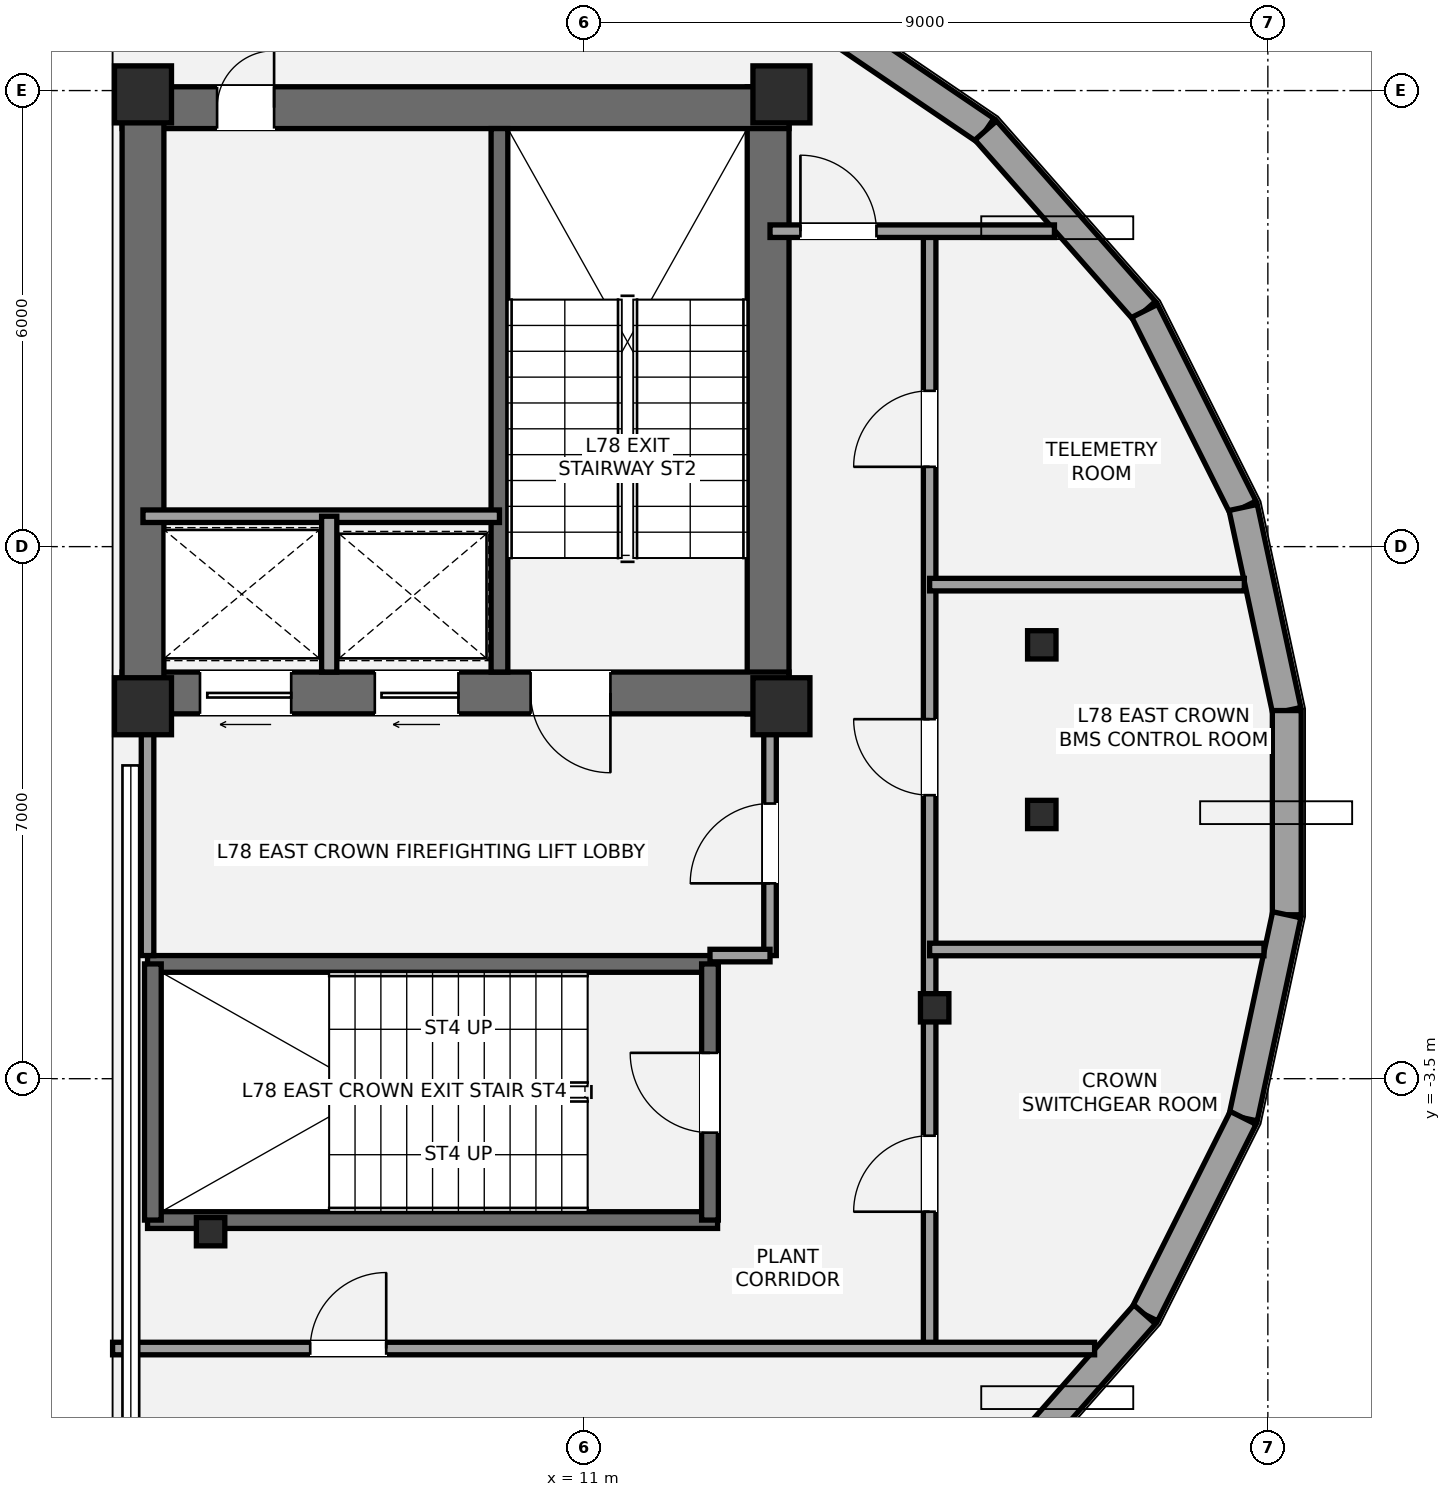
"""IFC4 building model, lengths in metres.
Left out: names, types, materials, properties, quantities, classifications, styles, units other than length and angle.
Written with IfcOpenShell. Run it as: python <this file> out.ifc"""

import sys

from ifc_helpers import new_model, si_unit, direction, frame, frame_2d, origin, origin_2d, place, context, subcontext, project, spatial, rectangle, i_section, extrude, element, fill, save


model = new_model("IFC4")
c1 = context("Model", 3, precision=1e-05, world=origin(), true_north=direction((0.0, 1.0)))
c2 = subcontext(c1, "Body", "Model", "MODEL_VIEW")
j1 = project(units=[si_unit("LENGTHUNIT", "METRE"), si_unit("PLANEANGLEUNIT", "RADIAN")], contexts=[c1])
p1 = place(None, origin())
s1 = spatial("IfcSite", under=j1, at=p1, CompositionType="ELEMENT")
p2 = place(p1, origin())
s2 = spatial("IfcBuilding", under=s1, at=p2, CompositionType="ELEMENT")
p3 = place(p2, frame((0.0, 0.0, 276.8)))
s3 = spatial("IfcBuildingStorey", under=s2, at=p3, CompositionType="ELEMENT", Elevation=276.8)
p4 = place(p3, frame((13.425, 1.3, 0.0), z_axis=(0.0, 0.0, 1.0), x_axis=(0.0, 1.0, 0.0)))
e1 = element("IfcWall", 1, at=p4, inside=s3, PredefinedType="SHEAR", context=c2, shape_type="SweptSolid", body=[
    extrude(rectangle(XDim=8.25, YDim=0.55, at=frame_2d((4.125, 0.0))), origin(), (0.0, 0.0, 1.0), 3.8),
])
p5 = place(p3, frame((4.925, 9.275, 0.0), z_axis=(0.0, 0.0, 1.0), x_axis=(1.0, 0.0, 0.0)))
e2 = element("IfcWall", 2, at=p5, inside=s3, PredefinedType="SHEAR", context=c2, shape_type="SweptSolid", body=[
    extrude(rectangle(XDim=8.775, YDim=0.55, at=frame_2d((4.387, 0.0))), origin(), (0.0, 0.0, 1.0), 3.8),
])
p6 = place(p5, frame((1.25, 0.0, 0.0)))
e3 = element("IfcOpeningElement", 3, at=p6, cuts=e2, PredefinedType="OPENING", context=c2, shape_type="SweptSolid", body=[
    extrude(rectangle(XDim=0.75, YDim=2.1, at=frame_2d((0.375, 1.05))), frame((0.0, 0.285, 0.0), z_axis=(0.0, -1.0, 0.0), x_axis=(1.0, 0.0, 0.0)), (0.0, 0.0, 1.0), 0.57),
])
p7 = place(p3, frame((13.7, 1.575, 0.0), z_axis=(0.0, 0.0, 1.0), x_axis=(-1.0, 0.0, 0.0)))
e4 = element("IfcWall", 4, at=p7, inside=s3, PredefinedType="SHEAR", context=c2, shape_type="SweptSolid", body=[
    extrude(rectangle(XDim=8.775, YDim=0.55, at=frame_2d((4.387, 0.0))), origin(), (0.0, 0.0, 1.0), 3.8),
])
p8 = place(p7, frame((2.35, 0.0, 0.0)))
e5 = element("IfcOpeningElement", 5, at=p8, cuts=e4, PredefinedType="OPENING", context=c2, shape_type="SweptSolid", body=[
    extrude(rectangle(XDim=1.05, YDim=2.15, at=frame_2d((0.525, 1.075))), frame((0.0, 0.285, 0.0), z_axis=(0.0, -1.0, 0.0), x_axis=(1.0, 0.0, 0.0)), (0.0, 0.0, 1.0), 0.57),
])
p9 = place(p7, frame((6.55, 0.0, 0.0)))
e6 = element("IfcOpeningElement", 6, at=p9, cuts=e4, PredefinedType="OPENING", context=c2, shape_type="SweptSolid", body=[
    extrude(rectangle(XDim=1.2, YDim=2.2, at=frame_2d((0.6, 1.1))), frame((0.0, 0.285, 0.0), z_axis=(0.0, -1.0, 0.0), x_axis=(1.0, 0.0, 0.0)), (0.0, 0.0, 1.0), 0.57),
])
p10 = place(p7, frame((4.35, 0.0, 0.0)))
e7 = element("IfcOpeningElement", 7, at=p10, cuts=e4, PredefinedType="OPENING", context=c2, shape_type="SweptSolid", body=[
    extrude(rectangle(XDim=1.1, YDim=2.2, at=frame_2d((0.55, 1.1))), frame((0.0, 0.285, 0.0), z_axis=(0.0, -1.0, 0.0), x_axis=(1.0, 0.0, 0.0)), (0.0, 0.0, 1.0), 0.57),
])
p11 = place(p3, frame((5.2, 1.3, 0.0), z_axis=(0.0, 0.0, 1.0), x_axis=(0.0, 1.0, 0.0)))
e8 = element("IfcWall", 8, at=p11, inside=s3, PredefinedType="SHEAR", context=c2, shape_type="SweptSolid", body=[
    extrude(rectangle(XDim=8.25, YDim=0.55, at=frame_2d((4.125, 0.0))), origin(), (0.0, 0.0, 1.0), 3.8),
])
p12 = place(p3, frame((9.89, 1.85, 0.0), z_axis=(0.0, 0.0, 1.0), x_axis=(0.0, 1.0, 0.0)))
e9 = element("IfcWall", 9, at=p12, inside=s3, PredefinedType="SHEAR", context=c2, shape_type="SweptSolid", body=[
    extrude(rectangle(XDim=7.15, YDim=0.22, at=frame_2d((3.575, 0.0))), origin(), (0.0, 0.0, 1.0), 3.8),
])
for number, where, z_axis, x_axis in (
    (10, (5.26, -1.99, 0.0), (0.0, 0.0, 1.0), (1.0, 0.0, 0.0)),
    (11, (5.26, -5.36, 0.0), (0.0, 0.0, 1.0), (1.0, 0.0, 0.0)),
):
    element("IfcWall", number, at=place(p3, frame(where, z_axis=z_axis, x_axis=x_axis)), inside=s3, PredefinedType="SHEAR", context=c2, shape_type="SweptSolid", body=[
        extrude(rectangle(XDim=7.5, YDim=0.22, at=frame_2d((3.75, 0.0))), origin(), (0.0, 0.0, 1.0), 3.8),
    ])
p13 = place(p3, frame((5.33, -5.36, 0.0), z_axis=(0.0, 0.0, 1.0), x_axis=(0.0, 1.0, 0.0)))
e12 = element("IfcWall", 12, at=p13, inside=s3, PredefinedType="SHEAR", context=c2, shape_type="SweptSolid", body=[
    extrude(rectangle(XDim=3.37, YDim=0.22, at=frame_2d((1.685, 0.0))), origin(), (0.0, 0.0, 1.0), 3.8),
])
p14 = place(p3, frame((12.66, -5.36, 0.0), z_axis=(0.0, 0.0, 1.0), x_axis=(0.0, 1.0, 0.0)))
e13 = element("IfcWall", 13, at=p14, inside=s3, PredefinedType="SHEAR", context=c2, shape_type="SweptSolid", body=[
    extrude(rectangle(XDim=3.37, YDim=0.22, at=frame_2d((1.685, 0.0))), origin(), (0.0, 0.0, 1.0), 3.8),
])
p15 = place(p14, frame((1.15, 0.0, 0.0)))
e14 = element("IfcOpeningElement", 14, at=p15, cuts=e13, PredefinedType="OPENING", context=c2, shape_type="SweptSolid", body=[
    extrude(rectangle(XDim=1.05, YDim=2.15, at=frame_2d((0.525, 1.075))), frame((0.0, 0.12, 0.0), z_axis=(0.0, -1.0, 0.0), x_axis=(1.0, 0.0, 0.0)), (0.0, 0.0, 1.0), 0.24),
])
for number, where, z_axis, x_axis in (
    (15, (5.2, 1.4, 0.0), (0.0, 0.0, 1.0), (1.0, 0.0, 0.0)),
    (16, (5.2, 9.45, 0.0), (0.0, 0.0, 1.0), (1.0, 0.0, 0.0)),
    (17, (13.6, 1.4, 0.0), (0.0, 0.0, 1.0), (1.0, 0.0, 0.0)),
    (18, (13.6, 9.45, 0.0), (0.0, 0.0, 1.0), (1.0, 0.0, 0.0)),
):
    element("IfcColumn", number, at=place(p3, frame(where, z_axis=z_axis, x_axis=x_axis)), inside=s3, PredefinedType="PILASTER", context=c2, shape_type="SweptSolid", body=[
        extrude(rectangle(XDim=0.75, YDim=0.75, at=origin_2d()), origin(), (0.0, 0.0, 1.0), 3.8),
    ])
for number, where, z_axis, x_axis in (
    (19, (17.026, 2.208, 0.0), (0.0, 0.0, 1.0), (1.0, 0.0, 0.0)),
    (20, (6.09, -5.513, 0.0), (0.0, 0.0, 1.0), (1.0, 0.0, 0.0)),
    (21, (15.616, -2.567, 0.0), (0.0, 0.0, 1.0), (1.0, 0.0, 0.0)),
    (22, (17.026, -0.024, 0.0), (0.0, 0.0, 1.0), (1.0, 0.0, 0.0)),
):
    element("IfcColumn", number, at=place(p3, frame(where, z_axis=z_axis, x_axis=x_axis)), inside=s3, PredefinedType="COLUMN", context=c2, shape_type="SweptSolid", body=[
        extrude(i_section(OverallWidth=0.374, OverallDepth=0.372, WebThickness=0.016, FlangeThickness=0.026, at=origin_2d()), origin(), (0.0, 0.0, 1.0), 3.8),
    ])
p16 = place(p3, frame((16.289, 8.975, 0.0), z_axis=(0.0, 0.0, 1.0), x_axis=(-0.827558908117, 0.561378885955, 0.0)))
e23 = element("IfcWall", 23, at=p16, inside=s3, PredefinedType="ELEMENTEDWALL", context=c2, shape_type="SweptSolid", body=[
    extrude(rectangle(XDim=3.508, YDim=0.38, at=frame_2d((1.754, 0.0))), origin(), (0.0, 0.0, 1.0), 2.97),
])
p17 = place(p3, frame((18.379, 6.602, 0.0), z_axis=(0.0, 0.0, 1.0), x_axis=(-0.660965358004, 0.750416414745, 0.0)))
e24 = element("IfcWall", 24, at=p17, inside=s3, PredefinedType="ELEMENTEDWALL", context=c2, shape_type="SweptSolid", body=[
    extrude(rectangle(XDim=3.163, YDim=0.38, at=frame_2d((1.582, 0.0))), origin(), (0.0, 0.0, 1.0), 2.97),
])
p18 = place(p3, frame((19.675, 4.015, 0.0), z_axis=(0.0, 0.0, 1.0), x_axis=(-0.447922433418, 0.894072420803, 0.0)))
e25 = element("IfcWall", 25, at=p18, inside=s3, PredefinedType="ELEMENTEDWALL", context=c2, shape_type="SweptSolid", body=[
    extrude(rectangle(XDim=2.893, YDim=0.38, at=frame_2d((1.446, 0.0))), origin(), (0.0, 0.0, 1.0), 2.97),
])
p19 = place(p3, frame((20.249, 1.344, 0.0), z_axis=(0.0, 0.0, 1.0), x_axis=(-0.210029343878, 0.977695082687, 0.0)))
e26 = element("IfcWall", 26, at=p19, inside=s3, PredefinedType="ELEMENTEDWALL", context=c2, shape_type="SweptSolid", body=[
    extrude(rectangle(XDim=2.733, YDim=0.38, at=frame_2d((1.366, 0.0))), origin(), (0.0, 0.0, 1.0), 2.97),
])
p20 = place(p3, frame((20.249, -1.344, 0.0), z_axis=(0.0, 0.0, 1.0), x_axis=(0.0, 1.0, 0.0)))
e27 = element("IfcWall", 27, at=p20, inside=s3, PredefinedType="ELEMENTEDWALL", context=c2, shape_type="SweptSolid", body=[
    extrude(rectangle(XDim=2.687, YDim=0.38, at=frame_2d((1.344, 0.0))), origin(), (0.0, 0.0, 1.0), 2.97),
])
p21 = place(p3, frame((19.675, -4.015, 0.0), z_axis=(0.0, 0.0, 1.0), x_axis=(0.210029343878, 0.977695082687, 0.0)))
e28 = element("IfcWall", 28, at=p21, inside=s3, PredefinedType="ELEMENTEDWALL", context=c2, shape_type="SweptSolid", body=[
    extrude(rectangle(XDim=2.733, YDim=0.38, at=frame_2d((1.366, 0.0))), origin(), (0.0, 0.0, 1.0), 2.97),
])
p22 = place(p3, frame((18.379, -6.602, 0.0), z_axis=(0.0, 0.0, 1.0), x_axis=(0.447922433418, 0.894072420803, 0.0)))
e29 = element("IfcWall", 29, at=p22, inside=s3, PredefinedType="ELEMENTEDWALL", context=c2, shape_type="SweptSolid", body=[
    extrude(rectangle(XDim=2.893, YDim=0.38, at=frame_2d((1.446, 0.0))), origin(), (0.0, 0.0, 1.0), 2.97),
])
p23 = place(p3, frame((16.289, -8.975, 0.0), z_axis=(0.0, 0.0, 1.0), x_axis=(0.660965358004, 0.750416414745, 0.0)))
e30 = element("IfcWall", 30, at=p23, inside=s3, PredefinedType="ELEMENTEDWALL", context=c2, shape_type="SweptSolid", body=[
    extrude(rectangle(XDim=3.163, YDim=0.38, at=frame_2d((1.582, 0.0))), origin(), (0.0, 0.0, 1.0), 2.97),
])
p24 = place(p3, frame((5.2, 3.9, 0.0), z_axis=(0.0, 0.0, 1.0), x_axis=(1.0, 0.0, 0.0)))
e31 = element("IfcWall", 31, at=p24, inside=s3, PredefinedType="PARTITIONING", context=c2, shape_type="SweptSolid", body=[
    extrude(rectangle(XDim=4.69, YDim=0.165, at=frame_2d((2.345, 0.0))), origin(), (0.0, 0.0, 1.0), 3.6),
])
p25 = place(p3, frame((7.65, 1.85, 0.0), z_axis=(0.0, 0.0, 1.0), x_axis=(0.0, 1.0, 0.0)))
e32 = element("IfcWall", 32, at=p25, inside=s3, PredefinedType="SOLIDWALL", context=c2, shape_type="SweptSolid", body=[
    extrude(rectangle(XDim=2.05, YDim=0.2, at=frame_2d((1.025, 0.0))), origin(), (0.0, 0.0, 1.0), 3.6),
])
p26 = place(p3, frame((5.26, -1.88, 0.0), z_axis=(0.0, 0.0, 1.0), x_axis=(0.0, 1.0, 0.0)))
e33 = element("IfcWall", 33, at=p26, inside=s3, PredefinedType="PARTITIONING", context=c2, shape_type="SweptSolid", body=[
    extrude(rectangle(XDim=3.23, YDim=0.165, at=frame_2d((1.615, 0.0))), origin(), (0.0, 0.0, 1.0), 3.6),
])
p27 = place(p3, frame((13.45, -1.88, 0.0), z_axis=(0.0, 0.0, 1.0), x_axis=(0.0, 1.0, 0.0)))
e34 = element("IfcWall", 34, at=p27, inside=s3, PredefinedType="PARTITIONING", context=c2, shape_type="SweptSolid", body=[
    extrude(rectangle(XDim=3.23, YDim=0.165, at=frame_2d((1.615, 0.0))), origin(), (0.0, 0.0, 1.0), 3.061),
])
p28 = place(p27, frame((0.95, 0.0, 0.0)))
e35 = element("IfcOpeningElement", 35, at=p28, cuts=e34, PredefinedType="OPENING", context=c2, shape_type="SweptSolid", body=[
    extrude(rectangle(XDim=1.05, YDim=2.15, at=frame_2d((0.525, 1.075))), frame((0.0, 0.093, 0.0), z_axis=(0.0, -1.0, 0.0), x_axis=(1.0, 0.0, 0.0)), (0.0, 0.0, 1.0), 0.185),
])
p29 = place(p3, frame((12.66, -1.88, 0.0), z_axis=(0.0, 0.0, 1.0), x_axis=(1.0, 0.0, 0.0)))
e36 = element("IfcWall", 36, at=p29, inside=s3, PredefinedType="PARTITIONING", context=c2, shape_type="SweptSolid", body=[
    extrude(rectangle(XDim=0.79, YDim=0.165, at=frame_2d((0.395, 0.0))), origin(), (0.0, 0.0, 1.0), 3.061),
])
p30 = place(p3, frame((15.55, -7.05, 0.0), z_axis=(0.0, 0.0, 1.0), x_axis=(0.0, 1.0, 0.0)))
e37 = element("IfcWall", 37, at=p30, inside=s3, PredefinedType="PARTITIONING", context=c2, shape_type="SweptSolid", body=[
    extrude(rectangle(XDim=14.7, YDim=0.165, at=frame_2d((7.35, 0.0))), origin(), (0.0, 0.0, 1.0), 2.987),
])
p31 = place(p30, frame((1.8, 0.0, 0.0)))
e38 = element("IfcOpeningElement", 38, at=p31, cuts=e37, PredefinedType="OPENING", context=c2, shape_type="SweptSolid", body=[
    extrude(rectangle(XDim=1.0, YDim=2.15, at=frame_2d((0.5, 1.075))), frame((0.0, 0.093, 0.0), z_axis=(0.0, -1.0, 0.0), x_axis=(1.0, 0.0, 0.0)), (0.0, 0.0, 1.0), 0.185),
])
p32 = place(p30, frame((7.28, 0.0, 0.0)))
e39 = element("IfcOpeningElement", 39, at=p32, cuts=e37, PredefinedType="OPENING", context=c2, shape_type="SweptSolid", body=[
    extrude(rectangle(XDim=1.0, YDim=2.15, at=frame_2d((0.5, 1.075))), frame((0.0, 0.093, 0.0), z_axis=(0.0, -1.0, 0.0), x_axis=(1.0, 0.0, 0.0)), (0.0, 0.0, 1.0), 0.185),
])
p33 = place(p30, frame((11.6, 0.0, 0.0)))
e40 = element("IfcOpeningElement", 40, at=p33, cuts=e37, PredefinedType="OPENING", context=c2, shape_type="SweptSolid", body=[
    extrude(rectangle(XDim=1.0, YDim=2.15, at=frame_2d((0.5, 1.075))), frame((0.0, 0.093, 0.0), z_axis=(0.0, -1.0, 0.0), x_axis=(1.0, 0.0, 0.0)), (0.0, 0.0, 1.0), 0.185),
])
p34 = place(p3, frame((4.8, -7.05, 0.0), z_axis=(0.0, 0.0, 1.0), x_axis=(1.0, 0.0, 0.0)))
e41 = element("IfcWall", 41, at=p34, inside=s3, PredefinedType="PARTITIONING", context=c2, shape_type="SweptSolid", body=[
    extrude(rectangle(XDim=12.92, YDim=0.165, at=frame_2d((6.46, 0.0))), origin(), (0.0, 0.0, 1.0), 2.968),
])
p35 = place(p34, frame((2.6, 0.0, 0.0)))
e42 = element("IfcOpeningElement", 42, at=p35, cuts=e41, PredefinedType="OPENING", context=c2, shape_type="SweptSolid", body=[
    extrude(rectangle(XDim=1.0, YDim=2.15, at=frame_2d((0.5, 1.075))), frame((0.0, 0.093, 0.0), z_axis=(0.0, -1.0, 0.0), x_axis=(1.0, 0.0, 0.0)), (0.0, 0.0, 1.0), 0.185),
])
p36 = place(p3, frame((13.45, 7.65, 0.0), z_axis=(0.0, 0.0, 1.0), x_axis=(1.0, 0.0, 0.0)))
e43 = element("IfcWall", 43, at=p36, inside=s3, PredefinedType="PARTITIONING", context=c2, shape_type="SweptSolid", body=[
    extrude(rectangle(XDim=3.742, YDim=0.165, at=frame_2d((1.871, 0.0))), origin(), (0.0, 0.0, 1.0), 2.968),
])
p37 = place(p36, frame((0.4, 0.0, 0.0)))
e44 = element("IfcOpeningElement", 44, at=p37, cuts=e43, PredefinedType="OPENING", context=c2, shape_type="SweptSolid", body=[
    extrude(rectangle(XDim=1.0, YDim=2.15, at=frame_2d((0.5, 1.075))), frame((0.0, 0.093, 0.0), z_axis=(0.0, -1.0, 0.0), x_axis=(1.0, 0.0, 0.0)), (0.0, 0.0, 1.0), 0.185),
])
p38 = place(p3, frame((15.55, -1.8, 0.0), z_axis=(0.0, 0.0, 1.0), x_axis=(1.0, 0.0, 0.0)))
e45 = element("IfcWall", 45, at=p38, inside=s3, PredefinedType="PARTITIONING", context=c2, shape_type="SweptSolid", body=[
    extrude(rectangle(XDim=4.398, YDim=0.165, at=frame_2d((2.199, 0.0))), origin(), (0.0, 0.0, 1.0), 3.6),
])
p39 = place(p3, frame((15.55, 3.0, 0.0), z_axis=(0.0, 0.0, 1.0), x_axis=(1.0, 0.0, 0.0)))
e46 = element("IfcWall", 46, at=p39, inside=s3, PredefinedType="PARTITIONING", context=c2, shape_type="SweptSolid", body=[
    extrude(rectangle(XDim=4.141, YDim=0.165, at=frame_2d((2.07, 0.0))), origin(), (0.0, 0.0, 1.0), 3.061),
])
p40 = place(p28, origin())
e47 = element("IfcDoor", 47, at=p40, inside=s3, OperationType="SINGLE_SWING_LEFT", PredefinedType="DOOR", context=c2, shape_type="SweptSolid", body=[
    extrude(rectangle(XDim=1.05, YDim=2.15, at=frame_2d((0.525, 1.075))), frame((0.0, 0.025, 0.0), z_axis=(0.0, -1.0, 0.0), x_axis=(1.0, 0.0, 0.0)), (0.0, 0.0, 1.0), 0.05),
])
fill(e35, e47)
p41 = place(p8, origin())
e48 = element("IfcDoor", 48, at=p41, inside=s3, OperationType="SINGLE_SWING_LEFT", PredefinedType="DOOR", context=c2, shape_type="SweptSolid", body=[
    extrude(rectangle(XDim=1.05, YDim=2.15, at=frame_2d((0.525, 1.075))), frame((0.0, 0.025, 0.0), z_axis=(0.0, -1.0, 0.0), x_axis=(1.0, 0.0, 0.0)), (0.0, 0.0, 1.0), 0.05),
])
fill(e5, e48)
p42 = place(p15, origin())
e49 = element("IfcDoor", 49, at=p42, inside=s3, OperationType="SINGLE_SWING_RIGHT", PredefinedType="DOOR", context=c2, shape_type="SweptSolid", body=[
    extrude(rectangle(XDim=1.05, YDim=2.15, at=frame_2d((0.525, 1.075))), frame((0.0, 0.025, 0.0), z_axis=(0.0, -1.0, 0.0), x_axis=(1.0, 0.0, 0.0)), (0.0, 0.0, 1.0), 0.05),
])
fill(e14, e49)
p43 = place(p6, origin())
e50 = element("IfcDoor", 50, at=p43, inside=s3, OperationType="SINGLE_SWING_RIGHT", PredefinedType="DOOR", context=c2, shape_type="SweptSolid", body=[
    extrude(rectangle(XDim=0.75, YDim=2.1, at=frame_2d((0.375, 1.05))), frame((0.0, 0.025, 0.0), z_axis=(0.0, -1.0, 0.0), x_axis=(1.0, 0.0, 0.0)), (0.0, 0.0, 1.0), 0.05),
])
fill(e3, e50)
p44 = place(p9, origin())
e51 = element("IfcDoor", 51, at=p44, inside=s3, OperationType="SLIDING_TO_RIGHT", PredefinedType="DOOR", context=c2, shape_type="SweptSolid", body=[
    extrude(rectangle(XDim=1.2, YDim=2.2, at=frame_2d((0.6, 1.1))), frame((0.0, 0.025, 0.0), z_axis=(0.0, -1.0, 0.0), x_axis=(1.0, 0.0, 0.0)), (0.0, 0.0, 1.0), 0.05),
])
fill(e6, e51)
p45 = place(p10, origin())
e52 = element("IfcDoor", 52, at=p45, inside=s3, OperationType="SLIDING_TO_LEFT", PredefinedType="DOOR", context=c2, shape_type="SweptSolid", body=[
    extrude(rectangle(XDim=1.1, YDim=2.2, at=frame_2d((0.55, 1.1))), frame((0.0, 0.025, 0.0), z_axis=(0.0, -1.0, 0.0), x_axis=(1.0, 0.0, 0.0)), (0.0, 0.0, 1.0), 0.05),
])
fill(e7, e52)
p46 = place(p37, origin())
e53 = element("IfcDoor", 53, at=p46, inside=s3, OperationType="SINGLE_SWING_LEFT", PredefinedType="DOOR", context=c2, shape_type="SweptSolid", body=[
    extrude(rectangle(XDim=1.0, YDim=2.15, at=frame_2d((0.5, 1.075))), frame((0.0, 0.025, 0.0), z_axis=(0.0, -1.0, 0.0), x_axis=(1.0, 0.0, 0.0)), (0.0, 0.0, 1.0), 0.05),
])
fill(e44, e53)
p47 = place(p35, origin())
e54 = element("IfcDoor", 54, at=p47, inside=s3, OperationType="SINGLE_SWING_RIGHT", PredefinedType="DOOR", context=c2, shape_type="SweptSolid", body=[
    extrude(rectangle(XDim=1.0, YDim=2.15, at=frame_2d((0.5, 1.075))), frame((0.0, 0.025, 0.0), z_axis=(0.0, -1.0, 0.0), x_axis=(1.0, 0.0, 0.0)), (0.0, 0.0, 1.0), 0.05),
])
fill(e42, e54)
p48 = place(p31, origin())
e55 = element("IfcDoor", 55, at=p48, inside=s3, OperationType="SINGLE_SWING_LEFT", PredefinedType="DOOR", context=c2, shape_type="SweptSolid", body=[
    extrude(rectangle(XDim=1.0, YDim=2.15, at=frame_2d((0.5, 1.075))), frame((0.0, 0.025, 0.0), z_axis=(0.0, -1.0, 0.0), x_axis=(1.0, 0.0, 0.0)), (0.0, 0.0, 1.0), 0.05),
])
fill(e38, e55)
p49 = place(p32, origin())
e56 = element("IfcDoor", 56, at=p49, inside=s3, OperationType="SINGLE_SWING_RIGHT", PredefinedType="DOOR", context=c2, shape_type="SweptSolid", body=[
    extrude(rectangle(XDim=1.0, YDim=2.15, at=frame_2d((0.5, 1.075))), frame((0.0, 0.025, 0.0), z_axis=(0.0, -1.0, 0.0), x_axis=(1.0, 0.0, 0.0)), (0.0, 0.0, 1.0), 0.05),
])
fill(e39, e56)
p50 = place(p33, origin())
e57 = element("IfcDoor", 57, at=p50, inside=s3, OperationType="SINGLE_SWING_LEFT", PredefinedType="DOOR", context=c2, shape_type="SweptSolid", body=[
    extrude(rectangle(XDim=1.0, YDim=2.15, at=frame_2d((0.5, 1.075))), frame((0.0, 0.025, 0.0), z_axis=(0.0, -1.0, 0.0), x_axis=(1.0, 0.0, 0.0)), (0.0, 0.0, 1.0), 0.05),
])
fill(e40, e57)
save(model, sys.argv[1])
